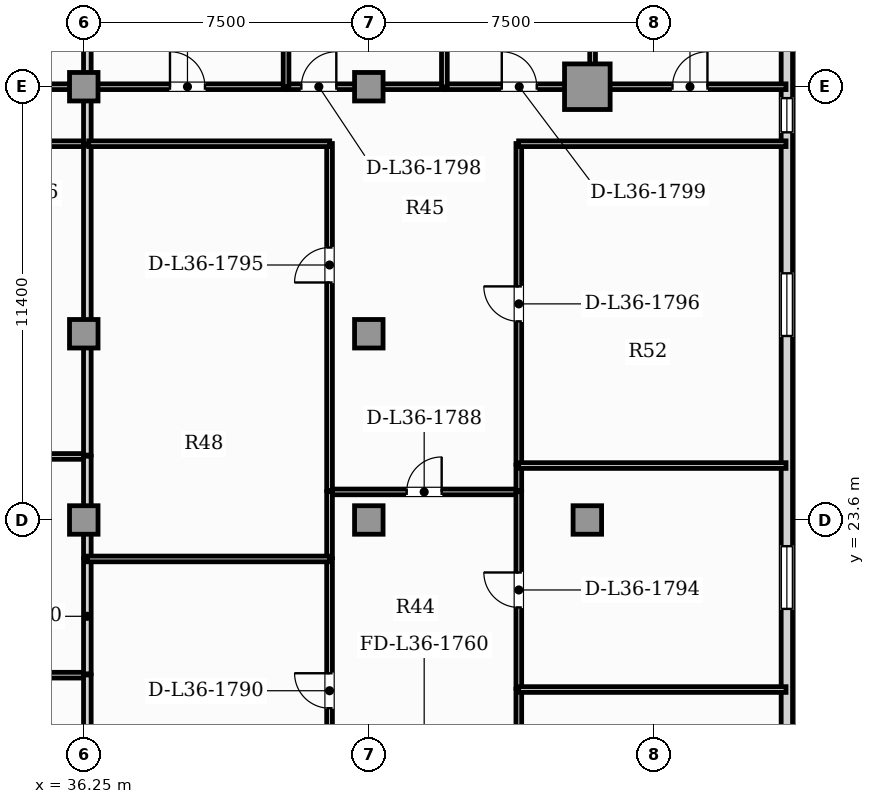
"""IFC4 building model, lengths in metres.
Left out: names, types, materials, properties, quantities, classifications, styles, units other than length and angle.
Written with IfcOpenShell. Run it as: python <this file> out.ifc"""

import sys

from ifc_helpers import new_model, si_unit, direction, frame, frame_2d, origin, origin_2d, place, context, subcontext, project, spatial, rectangle, hollow_rectangle, extrude, element, fill, save


model = new_model("IFC4")
c1 = context("Model", 3, precision=1e-05, world=origin(), true_north=direction((0.0, 1.0)))
c2 = subcontext(c1, "Body", "Model", "MODEL_VIEW")
j1 = project(units=[si_unit("LENGTHUNIT", "METRE"), si_unit("PLANEANGLEUNIT", "RADIAN")], contexts=[c1])
p1 = place(None, origin())
s1 = spatial("IfcSite", under=j1, at=p1, CompositionType="ELEMENT")
p2 = place(p1, origin())
s2 = spatial("IfcBuilding", under=s1, at=p2, CompositionType="ELEMENT")
p3 = place(p2, frame((0.0, 0.0, 149.05)))
s3 = spatial("IfcBuildingStorey", under=s2, at=p3, CompositionType="ELEMENT", Elevation=149.05)
p4 = place(p3, frame((49.5, 35.0, 0.0), z_axis=(0.0, 0.0, 1.0), x_axis=(1.0, 0.0, 0.0)))
e1 = element("IfcColumn", 1, at=p4, inside=s3, PredefinedType="USERDEFINED", context=c2, shape_type="SweptSolid", body=[
    extrude(hollow_rectangle(XDim=1.2, YDim=1.2, WallThickness=0.07, at=origin_2d()), origin(), (0.0, 0.0, 1.0), 3.85),
])
for number, where, z_axis, x_axis in (
    (2, (36.25, 23.6, 0.0), (0.0, 0.0, 1.0), (1.0, 0.0, 0.0)),
    (3, (43.75, 23.6, 0.0), (0.0, 0.0, 1.0), (1.0, 0.0, 0.0)),
    (4, (49.5, 23.6, 0.0), (0.0, 0.0, 1.0), (1.0, 0.0, 0.0)),
    (5, (36.25, 28.5, 0.0), (0.0, 0.0, 1.0), (1.0, 0.0, 0.0)),
    (6, (43.75, 28.5, 0.0), (0.0, 0.0, 1.0), (1.0, 0.0, 0.0)),
    (7, (36.25, 35.0, 0.0), (0.0, 0.0, 1.0), (1.0, 0.0, 0.0)),
    (8, (43.75, 35.0, 0.0), (0.0, 0.0, 1.0), (1.0, 0.0, 0.0)),
):
    element("IfcColumn", number, at=place(p3, frame(where, z_axis=z_axis, x_axis=x_axis)), inside=s3, PredefinedType="COLUMN", context=c2, shape_type="SweptSolid", body=[
        extrude(rectangle(XDim=0.75, YDim=0.75, at=origin_2d()), origin(), (0.0, 0.0, 1.0), 3.85),
    ])
p5 = place(p3, frame((54.75, 3.24, 0.0), z_axis=(0.0, 0.0, 1.0), x_axis=(0.0, 1.0, 0.0)))
e9 = element("IfcWall", 9, at=p5, inside=s3, PredefinedType="SOLIDWALL", context=c2, shape_type="SweptSolid", body=[
    extrude(rectangle(XDim=36.72, YDim=0.3, at=frame_2d((18.36, 0.0))), origin(), (0.0, 0.0, 1.0), 3.63),
])
p6 = place(p5, frame((30.56, 0.0, 0.95)))
e10 = element("IfcOpeningElement", 10, at=p6, cuts=e9, PredefinedType="OPENING", context=c2, shape_type="SweptSolid", body=[
    extrude(rectangle(XDim=0.9, YDim=1.5, at=frame_2d((0.45, 0.75))), frame((0.0, 0.16, 0.0), z_axis=(0.0, -1.0, 0.0), x_axis=(1.0, 0.0, 0.0)), (0.0, 0.0, 1.0), 0.32),
])
p7 = place(p5, frame((10.995, 0.0, 0.95)))
e11 = element("IfcOpeningElement", 11, at=p7, cuts=e9, PredefinedType="OPENING", context=c2, shape_type="SweptSolid", body=[
    extrude(rectangle(XDim=0.9, YDim=1.5, at=frame_2d((0.45, 0.75))), frame((0.0, 0.16, 0.0), z_axis=(0.0, -1.0, 0.0), x_axis=(1.0, 0.0, 0.0)), (0.0, 0.0, 1.0), 0.32),
])
p8 = place(p5, frame((13.304, 0.0, 0.88)))
e12 = element("IfcOpeningElement", 12, at=p8, cuts=e9, PredefinedType="OPENING", context=c2, shape_type="SweptSolid", body=[
    extrude(rectangle(XDim=1.65, YDim=2.0, at=frame_2d((0.825, 1.0))), frame((0.0, 0.16, 0.0), z_axis=(0.0, -1.0, 0.0), x_axis=(1.0, 0.0, 0.0)), (0.0, 0.0, 1.0), 0.32),
])
p9 = place(p5, frame((18.021, 0.0, 0.88)))
e13 = element("IfcOpeningElement", 13, at=p9, cuts=e9, PredefinedType="OPENING", context=c2, shape_type="SweptSolid", body=[
    extrude(rectangle(XDim=1.65, YDim=2.0, at=frame_2d((0.825, 1.0))), frame((0.0, 0.16, 0.0), z_axis=(0.0, -1.0, 0.0), x_axis=(1.0, 0.0, 0.0)), (0.0, 0.0, 1.0), 0.32),
])
p10 = place(p5, frame((25.201, 0.0, 0.88)))
e14 = element("IfcOpeningElement", 14, at=p10, cuts=e9, PredefinedType="OPENING", context=c2, shape_type="SweptSolid", body=[
    extrude(rectangle(XDim=1.65, YDim=2.0, at=frame_2d((0.825, 1.0))), frame((0.0, 0.16, 0.0), z_axis=(0.0, -1.0, 0.0), x_axis=(1.0, 0.0, 0.0)), (0.0, 0.0, 1.0), 0.32),
])
p11 = place(p5, frame((32.759, 0.0, 0.88)))
e15 = element("IfcOpeningElement", 15, at=p11, cuts=e9, PredefinedType="OPENING", context=c2, shape_type="SweptSolid", body=[
    extrude(rectangle(XDim=1.65, YDim=2.0, at=frame_2d((0.825, 1.0))), frame((0.0, 0.16, 0.0), z_axis=(0.0, -1.0, 0.0), x_axis=(1.0, 0.0, 0.0)), (0.0, 0.0, 1.0), 0.32),
])
p12 = place(p3, frame((29.43, 33.5, 0.0), z_axis=(0.0, 0.0, 1.0), x_axis=(1.0, 0.0, 0.0)))
e16 = element("IfcWall", 16, at=p12, inside=s3, PredefinedType="PARTITIONING", context=c2, shape_type="SweptSolid", body=[
    extrude(rectangle(XDim=6.919, YDim=0.15, at=frame_2d((3.459, 0.0))), origin(), (0.0, 0.0, 1.0), 3.63),
])
p13 = place(p3, frame((32.622, 35.0, 0.0), z_axis=(0.0, 0.0, 1.0), x_axis=(1.0, 0.0, 0.0)))
e17 = element("IfcWall", 17, at=p13, inside=s3, PredefinedType="PARTITIONING", context=c2, shape_type="SweptSolid", body=[
    extrude(rectangle(XDim=3.728, YDim=0.15, at=frame_2d((1.864, 0.0))), origin(), (0.0, 0.0, 1.0), 3.013),
])
p14 = place(p13, frame((1.404, 0.0, 0.0)))
e18 = element("IfcOpeningElement", 18, at=p14, cuts=e17, PredefinedType="OPENING", context=c2, shape_type="SweptSolid", body=[
    extrude(rectangle(XDim=0.92, YDim=2.1, at=frame_2d((0.46, 1.05))), frame((0.0, 0.085, 0.0), z_axis=(0.0, -1.0, 0.0), x_axis=(1.0, 0.0, 0.0)), (0.0, 0.0, 1.0), 0.17),
])
p15 = place(p3, frame((36.344, 33.495, 0.0), z_axis=(0.0, 0.0, 1.0), x_axis=(0.0, 1.0, 0.0)))
e19 = element("IfcWall", 19, at=p15, inside=s3, PredefinedType="PARTITIONING", context=c2, shape_type="SweptSolid", body=[
    extrude(rectangle(XDim=1.51, YDim=0.2, at=frame_2d((0.755, 0.0))), origin(), (0.0, 0.0, 1.0), 3.177),
])
p16 = place(p3, frame((29.43, 19.517, 0.0), z_axis=(0.0, 0.0, 1.0), x_axis=(1.0, 0.0, 0.0)))
e20 = element("IfcWall", 20, at=p16, inside=s3, PredefinedType="PARTITIONING", context=c2, shape_type="SweptSolid", body=[
    extrude(rectangle(XDim=6.919, YDim=0.15, at=frame_2d((3.459, 0.0))), origin(), (0.0, 0.0, 1.0), 3.63),
])
p17 = place(p3, frame((36.344, 15.635, 0.0), z_axis=(0.0, 0.0, 1.0), x_axis=(0.0, 1.0, 0.0)))
e21 = element("IfcWall", 21, at=p17, inside=s3, PredefinedType="PARTITIONING", context=c2, shape_type="SweptSolid", body=[
    extrude(rectangle(XDim=3.886, YDim=0.2, at=frame_2d((1.943, 0.0))), origin(), (0.0, 0.0, 1.0), 3.177),
])
p18 = place(p3, frame((29.43, 25.272, 0.0), z_axis=(0.0, 0.0, 1.0), x_axis=(1.0, 0.0, 0.0)))
e22 = element("IfcWall", 22, at=p18, inside=s3, PredefinedType="PARTITIONING", context=c2, shape_type="SweptSolid", body=[
    extrude(rectangle(XDim=6.919, YDim=0.15, at=frame_2d((3.459, 0.0))), origin(), (0.0, 0.0, 1.0), 3.63),
])
p19 = place(p3, frame((36.344, 19.552, 0.0), z_axis=(0.0, 0.0, 1.0), x_axis=(0.0, 1.0, 0.0)))
e23 = element("IfcWall", 23, at=p19, inside=s3, PredefinedType="PARTITIONING", context=c2, shape_type="SweptSolid", body=[
    extrude(rectangle(XDim=3.028, YDim=0.2, at=frame_2d((1.514, 0.0))), origin(), (0.0, 0.0, 1.0), 3.177),
])
p20 = place(p3, frame((36.344, 22.61, 0.0), z_axis=(0.0, 0.0, 1.0), x_axis=(0.0, 1.0, 0.0)))
e24 = element("IfcWall", 24, at=p20, inside=s3, PredefinedType="PARTITIONING", context=c2, shape_type="SweptSolid", body=[
    extrude(rectangle(XDim=2.667, YDim=0.2, at=frame_2d((1.334, 0.0))), origin(), (0.0, 0.0, 1.0), 3.177),
])
p21 = place(p3, frame((36.344, 25.307, 0.0), z_axis=(0.0, 0.0, 1.0), x_axis=(0.0, 1.0, 0.0)))
e25 = element("IfcWall", 25, at=p21, inside=s3, PredefinedType="PARTITIONING", context=c2, shape_type="SweptSolid", body=[
    extrude(rectangle(XDim=8.158, YDim=0.2, at=frame_2d((4.079, 0.0))), origin(), (0.0, 0.0, 1.0), 3.177),
])
p22 = place(p3, frame((36.344, 35.035, 0.0), z_axis=(0.0, 0.0, 1.0), x_axis=(0.0, 1.0, 0.0)))
e26 = element("IfcWall", 26, at=p22, inside=s3, PredefinedType="PARTITIONING", context=c2, shape_type="SweptSolid", body=[
    extrude(rectangle(XDim=7.993, YDim=0.2, at=frame_2d((3.996, 0.0))), origin(), (0.0, 0.0, 1.0), 3.63),
])
p23 = place(p3, frame((42.712, 24.338, 0.0), z_axis=(0.0, 0.0, 1.0), x_axis=(1.0, 0.0, 0.0)))
e27 = element("IfcWall", 27, at=p23, inside=s3, PredefinedType="PARTITIONING", context=c2, shape_type="SweptSolid", body=[
    extrude(rectangle(XDim=4.99, YDim=0.15, at=frame_2d((2.495, 0.0))), origin(), (0.0, 0.0, 1.0), 3.63),
])
p24 = place(p23, frame((2.035, 0.0, 0.0)))
e28 = element("IfcOpeningElement", 28, at=p24, cuts=e27, PredefinedType="OPENING", context=c2, shape_type="SweptSolid", body=[
    extrude(rectangle(XDim=0.92, YDim=2.1, at=frame_2d((0.46, 1.05))), frame((0.0, 0.085, 0.0), z_axis=(0.0, -1.0, 0.0), x_axis=(1.0, 0.0, 0.0)), (0.0, 0.0, 1.0), 0.17),
])
p25 = place(p3, frame((42.717, 15.635, 0.0), z_axis=(0.0, 0.0, 1.0), x_axis=(0.0, 1.0, 0.0)))
e29 = element("IfcWall", 29, at=p25, inside=s3, PredefinedType="PARTITIONING", context=c2, shape_type="SweptSolid", body=[
    extrude(rectangle(XDim=6.945, YDim=0.15, at=frame_2d((3.472, 0.0))), origin(), (0.0, 0.0, 1.0), 3.63),
])
p26 = place(p25, frame((3.012, 0.0, 0.0)))
e30 = element("IfcOpeningElement", 30, at=p26, cuts=e29, PredefinedType="OPENING", context=c2, shape_type="SweptSolid", body=[
    extrude(rectangle(XDim=0.92, YDim=2.1, at=frame_2d((0.46, 1.05))), frame((0.0, 0.085, 0.0), z_axis=(0.0, -1.0, 0.0), x_axis=(1.0, 0.0, 0.0)), (0.0, 0.0, 1.0), 0.17),
])
p27 = place(p3, frame((42.717, 22.61, 0.0), z_axis=(0.0, 0.0, 1.0), x_axis=(0.0, 1.0, 0.0)))
e31 = element("IfcWall", 31, at=p27, inside=s3, PredefinedType="PARTITIONING", context=c2, shape_type="SweptSolid", body=[
    extrude(rectangle(XDim=1.734, YDim=0.15, at=frame_2d((0.867, 0.0))), origin(), (0.0, 0.0, 1.0), 3.63),
])
p28 = place(p3, frame((47.697, 15.635, 0.0), z_axis=(0.0, 0.0, 1.0), x_axis=(0.0, 1.0, 0.0)))
e32 = element("IfcWall", 32, at=p28, inside=s3, PredefinedType="PARTITIONING", context=c2, shape_type="SweptSolid", body=[
    extrude(rectangle(XDim=3.509, YDim=0.15, at=frame_2d((1.754, 0.0))), origin(), (0.0, 0.0, 1.0), 3.177),
])
p29 = place(p28, frame((1.294, 0.0, 0.0)))
e33 = element("IfcOpeningElement", 33, at=p29, cuts=e32, PredefinedType="OPENING", context=c2, shape_type="SweptSolid", body=[
    extrude(rectangle(XDim=0.92, YDim=2.1, at=frame_2d((0.46, 1.05))), frame((0.0, 0.085, 0.0), z_axis=(0.0, -1.0, 0.0), x_axis=(1.0, 0.0, 0.0)), (0.0, 0.0, 1.0), 0.17),
])
p30 = place(p3, frame((47.697, 19.174, 0.0), z_axis=(0.0, 0.0, 1.0), x_axis=(0.0, 1.0, 0.0)))
e34 = element("IfcWall", 34, at=p30, inside=s3, PredefinedType="PARTITIONING", context=c2, shape_type="SweptSolid", body=[
    extrude(rectangle(XDim=5.17, YDim=0.15, at=frame_2d((2.585, 0.0))), origin(), (0.0, 0.0, 1.0), 3.177),
])
p31 = place(p30, frame((2.125, 0.0, 0.0)))
e35 = element("IfcOpeningElement", 35, at=p31, cuts=e34, PredefinedType="OPENING", context=c2, shape_type="SweptSolid", body=[
    extrude(rectangle(XDim=0.92, YDim=2.1, at=frame_2d((0.46, 1.05))), frame((0.0, 0.085, 0.0), z_axis=(0.0, -1.0, 0.0), x_axis=(1.0, 0.0, 0.0)), (0.0, 0.0, 1.0), 0.17),
])
p32 = place(p3, frame((42.717, 24.374, 0.0), z_axis=(0.0, 0.0, 1.0), x_axis=(0.0, 1.0, 0.0)))
e36 = element("IfcWall", 36, at=p32, inside=s3, PredefinedType="PARTITIONING", context=c2, shape_type="SweptSolid", body=[
    extrude(rectangle(XDim=9.131, YDim=0.15, at=frame_2d((4.566, 0.0))), origin(), (0.0, 0.0, 1.0), 3.63),
])
p33 = place(p32, frame((5.476, 0.0, 0.0)))
e37 = element("IfcOpeningElement", 37, at=p33, cuts=e36, PredefinedType="OPENING", context=c2, shape_type="SweptSolid", body=[
    extrude(rectangle(XDim=0.92, YDim=2.1, at=frame_2d((0.46, 1.05))), frame((0.0, 0.085, 0.0), z_axis=(0.0, -1.0, 0.0), x_axis=(1.0, 0.0, 0.0)), (0.0, 0.0, 1.0), 0.17),
])
p34 = place(p3, frame((36.379, 33.5, 0.0), z_axis=(0.0, 0.0, 1.0), x_axis=(1.0, 0.0, 0.0)))
e38 = element("IfcWall", 38, at=p34, inside=s3, PredefinedType="PARTITIONING", context=c2, shape_type="SweptSolid", body=[
    extrude(rectangle(XDim=6.343, YDim=0.15, at=frame_2d((3.171, 0.0))), origin(), (0.0, 0.0, 1.0), 3.63),
])
p35 = place(p3, frame((47.697, 24.374, 0.0), z_axis=(0.0, 0.0, 1.0), x_axis=(0.0, 1.0, 0.0)))
e39 = element("IfcWall", 39, at=p35, inside=s3, PredefinedType="PARTITIONING", context=c2, shape_type="SweptSolid", body=[
    extrude(rectangle(XDim=0.664, YDim=0.15, at=frame_2d((0.332, 0.0))), origin(), (0.0, 0.0, 1.0), 3.63),
])
p36 = place(p3, frame((47.697, 25.067, 0.0), z_axis=(0.0, 0.0, 1.0), x_axis=(0.0, 1.0, 0.0)))
e40 = element("IfcWall", 40, at=p36, inside=s3, PredefinedType="PARTITIONING", context=c2, shape_type="SweptSolid", body=[
    extrude(rectangle(XDim=8.438, YDim=0.15, at=frame_2d((4.219, 0.0))), origin(), (0.0, 0.0, 1.0), 3.177),
])
p37 = place(p36, frame((3.759, 0.0, 0.0)))
e41 = element("IfcOpeningElement", 41, at=p37, cuts=e40, PredefinedType="OPENING", context=c2, shape_type="SweptSolid", body=[
    extrude(rectangle(XDim=0.92, YDim=2.1, at=frame_2d((0.46, 1.05))), frame((0.0, 0.085, 0.0), z_axis=(0.0, -1.0, 0.0), x_axis=(1.0, 0.0, 0.0)), (0.0, 0.0, 1.0), 0.17),
])
p38 = place(p3, frame((47.692, 33.5, 0.0), z_axis=(0.0, 0.0, 1.0), x_axis=(1.0, 0.0, 0.0)))
e42 = element("IfcWall", 42, at=p38, inside=s3, PredefinedType="PARTITIONING", context=c2, shape_type="SweptSolid", body=[
    extrude(rectangle(XDim=7.036, YDim=0.15, at=frame_2d((3.518, 0.0))), origin(), (0.0, 0.0, 1.0), 3.63),
])
p39 = place(p3, frame((36.379, 35.0, 0.0), z_axis=(0.0, 0.0, 1.0), x_axis=(1.0, 0.0, 0.0)))
e43 = element("IfcWall", 43, at=p39, inside=s3, PredefinedType="PARTITIONING", context=c2, shape_type="SweptSolid", body=[
    extrude(rectangle(XDim=5.198, YDim=0.15, at=frame_2d((2.599, 0.0))), origin(), (0.0, 0.0, 1.0), 3.013),
])
p40 = place(p39, frame((2.139, 0.0, 0.0)))
e44 = element("IfcOpeningElement", 44, at=p40, cuts=e43, PredefinedType="OPENING", context=c2, shape_type="SweptSolid", body=[
    extrude(rectangle(XDim=0.92, YDim=2.1, at=frame_2d((0.46, 1.05))), frame((0.0, 0.085, 0.0), z_axis=(0.0, -1.0, 0.0), x_axis=(1.0, 0.0, 0.0)), (0.0, 0.0, 1.0), 0.17),
])
p41 = place(p3, frame((41.608, 35.0, 0.0), z_axis=(0.0, 0.0, 1.0), x_axis=(1.0, 0.0, 0.0)))
e45 = element("IfcWall", 45, at=p41, inside=s3, PredefinedType="PARTITIONING", context=c2, shape_type="SweptSolid", body=[
    extrude(rectangle(XDim=4.136, YDim=0.15, at=frame_2d((2.068, 0.0))), origin(), (0.0, 0.0, 1.0), 3.013),
])
p42 = place(p41, frame((0.367, 0.0, 0.0)))
e46 = element("IfcOpeningElement", 46, at=p42, cuts=e45, PredefinedType="OPENING", context=c2, shape_type="SweptSolid", body=[
    extrude(rectangle(XDim=0.92, YDim=2.1, at=frame_2d((0.46, 1.05))), frame((0.0, 0.085, 0.0), z_axis=(0.0, -1.0, 0.0), x_axis=(1.0, 0.0, 0.0)), (0.0, 0.0, 1.0), 0.17),
])
p43 = place(p3, frame((45.773, 35.0, 0.0), z_axis=(0.0, 0.0, 1.0), x_axis=(1.0, 0.0, 0.0)))
e47 = element("IfcWall", 47, at=p43, inside=s3, PredefinedType="PARTITIONING", context=c2, shape_type="SweptSolid", body=[
    extrude(rectangle(XDim=3.87, YDim=0.15, at=frame_2d((1.935, 0.0))), origin(), (0.0, 0.0, 1.0), 3.013),
])
p44 = place(p43, frame((1.475, 0.0, 0.0)))
e48 = element("IfcOpeningElement", 48, at=p44, cuts=e47, PredefinedType="OPENING", context=c2, shape_type="SweptSolid", body=[
    extrude(rectangle(XDim=0.92, YDim=2.1, at=frame_2d((0.46, 1.05))), frame((0.0, 0.085, 0.0), z_axis=(0.0, -1.0, 0.0), x_axis=(1.0, 0.0, 0.0)), (0.0, 0.0, 1.0), 0.17),
])
p45 = place(p3, frame((49.674, 35.0, 0.0), z_axis=(0.0, 0.0, 1.0), x_axis=(1.0, 0.0, 0.0)))
e49 = element("IfcWall", 49, at=p45, inside=s3, PredefinedType="PARTITIONING", context=c2, shape_type="SweptSolid", body=[
    extrude(rectangle(XDim=5.054, YDim=0.15, at=frame_2d((2.527, 0.0))), origin(), (0.0, 0.0, 1.0), 3.63),
])
p46 = place(p45, frame((2.067, 0.0, 0.0)))
e50 = element("IfcOpeningElement", 50, at=p46, cuts=e49, PredefinedType="OPENING", context=c2, shape_type="SweptSolid", body=[
    extrude(rectangle(XDim=0.92, YDim=2.1, at=frame_2d((0.46, 1.05))), frame((0.0, 0.085, 0.0), z_axis=(0.0, -1.0, 0.0), x_axis=(1.0, 0.0, 0.0)), (0.0, 0.0, 1.0), 0.17),
])
p47 = place(p3, frame((36.339, 22.575, 0.0), z_axis=(0.0, 0.0, 1.0), x_axis=(1.0, 0.0, 0.0)))
e51 = element("IfcWall", 51, at=p47, inside=s3, PredefinedType="PARTITIONING", context=c2, shape_type="SweptSolid", body=[
    extrude(rectangle(XDim=6.383, YDim=0.15, at=frame_2d((3.191, 0.0))), origin(), (0.0, 0.0, 1.0), 3.63),
])
for number, where, z_axis, x_axis in (
    (52, (47.692, 19.139, 0.0), (0.0, 0.0, 1.0), (1.0, 0.0, 0.0)),
    (53, (47.692, 25.032, 0.0), (0.0, 0.0, 1.0), (1.0, 0.0, 0.0)),
):
    element("IfcWall", number, at=place(p3, frame(where, z_axis=z_axis, x_axis=x_axis)), inside=s3, PredefinedType="PARTITIONING", context=c2, shape_type="SweptSolid", body=[
        extrude(rectangle(XDim=7.036, YDim=0.15, at=frame_2d((3.518, 0.0))), origin(), (0.0, 0.0, 1.0), 3.63),
    ])
for number, where, z_axis, x_axis in (
    (54, (41.573, 34.995, 0.0), (0.0, 0.0, 1.0), (0.0, 1.0, 0.0)),
    (55, (45.739, 34.995, 0.0), (0.0, 0.0, 1.0), (0.0, 1.0, 0.0)),
    (56, (49.638, 34.995, 0.0), (0.0, 0.0, 1.0), (0.0, 1.0, 0.0)),
):
    element("IfcWall", number, at=place(p3, frame(where, z_axis=z_axis, x_axis=x_axis)), inside=s3, PredefinedType="PARTITIONING", context=c2, shape_type="SweptSolid", body=[
        extrude(rectangle(XDim=8.032, YDim=0.15, at=frame_2d((4.016, 0.0))), origin(), (0.0, 0.0, 1.0), 3.63),
    ])
p48 = place(p6, origin())
e57 = element("IfcWindow", 57, at=p48, inside=s3, PartitioningType="SINGLE_PANEL", PredefinedType="WINDOW", context=c2, shape_type="SweptSolid", body=[
    extrude(rectangle(XDim=0.9, YDim=1.5, at=frame_2d((0.45, 0.75))), frame((0.0, 0.03, 0.0), z_axis=(0.0, -1.0, 0.0), x_axis=(1.0, 0.0, 0.0)), (0.0, 0.0, 1.0), 0.06),
])
fill(e10, e57)
p49 = place(p9, origin())
e58 = element("IfcWindow", 58, at=p49, inside=s3, PartitioningType="SINGLE_PANEL", PredefinedType="WINDOW", context=c2, shape_type="SweptSolid", body=[
    extrude(rectangle(XDim=1.65, YDim=2.0, at=frame_2d((0.825, 1.0))), frame((0.0, 0.03, 0.0), z_axis=(0.0, -1.0, 0.0), x_axis=(1.0, 0.0, 0.0)), (0.0, 0.0, 1.0), 0.06),
])
fill(e13, e58)
p50 = place(p10, origin())
e59 = element("IfcWindow", 59, at=p50, inside=s3, PartitioningType="SINGLE_PANEL", PredefinedType="WINDOW", context=c2, shape_type="SweptSolid", body=[
    extrude(rectangle(XDim=1.65, YDim=2.0, at=frame_2d((0.825, 1.0))), frame((0.0, 0.03, 0.0), z_axis=(0.0, -1.0, 0.0), x_axis=(1.0, 0.0, 0.0)), (0.0, 0.0, 1.0), 0.06),
])
fill(e14, e59)
p51 = place(p24, origin())
e60 = element("IfcDoor", 60, at=p51, inside=s3, OperationType="SINGLE_SWING_RIGHT", PredefinedType="DOOR", context=c2, shape_type="SweptSolid", body=[
    extrude(rectangle(XDim=0.92, YDim=2.1, at=frame_2d((0.46, 1.05))), frame((0.0, 0.025, 0.0), z_axis=(0.0, -1.0, 0.0), x_axis=(1.0, 0.0, 0.0)), (0.0, 0.0, 1.0), 0.05),
])
fill(e28, e60)
p52 = place(p26, origin())
e61 = element("IfcDoor", 61, at=p52, inside=s3, OperationType="SINGLE_SWING_RIGHT", PredefinedType="DOOR", context=c2, shape_type="SweptSolid", body=[
    extrude(rectangle(XDim=0.92, YDim=2.1, at=frame_2d((0.46, 1.05))), frame((0.0, 0.025, 0.0), z_axis=(0.0, -1.0, 0.0), x_axis=(1.0, 0.0, 0.0)), (0.0, 0.0, 1.0), 0.05),
])
fill(e30, e61)
p53 = place(p31, origin())
e62 = element("IfcDoor", 62, at=p53, inside=s3, OperationType="SINGLE_SWING_RIGHT", PredefinedType="DOOR", context=c2, shape_type="SweptSolid", body=[
    extrude(rectangle(XDim=0.92, YDim=2.1, at=frame_2d((0.46, 1.05))), frame((0.0, 0.025, 0.0), z_axis=(0.0, -1.0, 0.0), x_axis=(1.0, 0.0, 0.0)), (0.0, 0.0, 1.0), 0.05),
])
fill(e35, e62)
p54 = place(p33, origin())
e63 = element("IfcDoor", 63, at=p54, inside=s3, OperationType="SINGLE_SWING_LEFT", PredefinedType="DOOR", context=c2, shape_type="SweptSolid", body=[
    extrude(rectangle(XDim=0.92, YDim=2.1, at=frame_2d((0.46, 1.05))), frame((0.0, 0.025, 0.0), z_axis=(0.0, -1.0, 0.0), x_axis=(1.0, 0.0, 0.0)), (0.0, 0.0, 1.0), 0.05),
])
fill(e37, e63)
p55 = place(p37, origin())
e64 = element("IfcDoor", 64, at=p55, inside=s3, OperationType="SINGLE_SWING_RIGHT", PredefinedType="DOOR", context=c2, shape_type="SweptSolid", body=[
    extrude(rectangle(XDim=0.92, YDim=2.1, at=frame_2d((0.46, 1.05))), frame((0.0, 0.025, 0.0), z_axis=(0.0, -1.0, 0.0), x_axis=(1.0, 0.0, 0.0)), (0.0, 0.0, 1.0), 0.05),
])
fill(e41, e64)
p56 = place(p40, origin())
e65 = element("IfcDoor", 65, at=p56, inside=s3, OperationType="SINGLE_SWING_LEFT", PredefinedType="DOOR", context=c2, shape_type="SweptSolid", body=[
    extrude(rectangle(XDim=0.92, YDim=2.1, at=frame_2d((0.46, 1.05))), frame((0.0, 0.025, 0.0), z_axis=(0.0, -1.0, 0.0), x_axis=(1.0, 0.0, 0.0)), (0.0, 0.0, 1.0), 0.05),
])
fill(e44, e65)
p57 = place(p42, origin())
e66 = element("IfcDoor", 66, at=p57, inside=s3, OperationType="SINGLE_SWING_RIGHT", PredefinedType="DOOR", context=c2, shape_type="SweptSolid", body=[
    extrude(rectangle(XDim=0.92, YDim=2.1, at=frame_2d((0.46, 1.05))), frame((0.0, 0.025, 0.0), z_axis=(0.0, -1.0, 0.0), x_axis=(1.0, 0.0, 0.0)), (0.0, 0.0, 1.0), 0.05),
])
fill(e46, e66)
p58 = place(p44, origin())
e67 = element("IfcDoor", 67, at=p58, inside=s3, OperationType="SINGLE_SWING_LEFT", PredefinedType="DOOR", context=c2, shape_type="SweptSolid", body=[
    extrude(rectangle(XDim=0.92, YDim=2.1, at=frame_2d((0.46, 1.05))), frame((0.0, 0.025, 0.0), z_axis=(0.0, -1.0, 0.0), x_axis=(1.0, 0.0, 0.0)), (0.0, 0.0, 1.0), 0.05),
])
fill(e48, e67)
p59 = place(p46, origin())
e68 = element("IfcDoor", 68, at=p59, inside=s3, OperationType="SINGLE_SWING_RIGHT", PredefinedType="DOOR", context=c2, shape_type="SweptSolid", body=[
    extrude(rectangle(XDim=0.92, YDim=2.1, at=frame_2d((0.46, 1.05))), frame((0.0, 0.025, 0.0), z_axis=(0.0, -1.0, 0.0), x_axis=(1.0, 0.0, 0.0)), (0.0, 0.0, 1.0), 0.05),
])
fill(e50, e68)
save(model, sys.argv[1])
